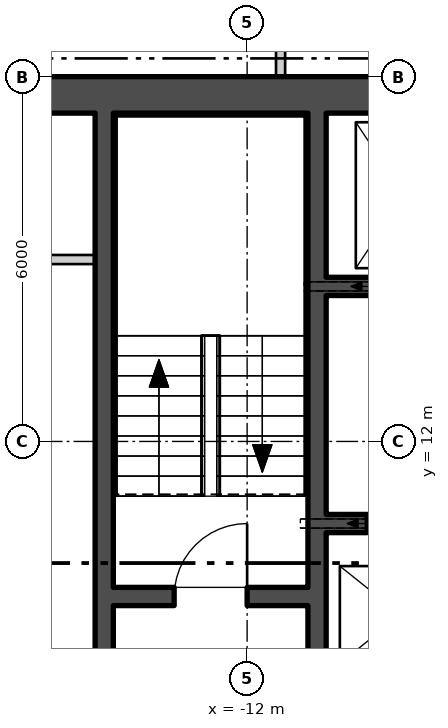
"""IFC4 building model, lengths in metres.
Left out: names, types, materials, properties, quantities, classifications, styles, units other than length and angle.
Written with IfcOpenShell. Run it as: python <this file> out.ifc"""

import sys

from ifc_helpers import new_model, si_unit, direction, frame, frame_2d, origin, place, context, subcontext, project, spatial, rectangle, extrude, element, fill, save


model = new_model("IFC4")
c1 = context("Model", 3, precision=1e-05, world=origin(), true_north=direction((0.0, 1.0)))
c2 = subcontext(c1, "Body", "Model", "MODEL_VIEW")
j1 = project(units=[si_unit("LENGTHUNIT", "METRE"), si_unit("PLANEANGLEUNIT", "RADIAN")], contexts=[c1])
p1 = place(None, origin())
s1 = spatial("IfcSite", under=j1, at=p1, CompositionType="ELEMENT")
p2 = place(p1, origin())
s2 = spatial("IfcBuilding", under=s1, at=p2, CompositionType="ELEMENT")
p3 = place(p2, frame((0.0, 0.0, 8.4)))
s3 = spatial("IfcBuildingStorey", under=s2, at=p3, CompositionType="ELEMENT", Elevation=8.4)
p4 = place(p3, frame((-17.5, 17.7, 0.0), z_axis=(0.0, 0.0, 1.0), x_axis=(1.0, 0.0, 0.0)))
e1 = element("IfcWall", 1, at=p4, inside=s3, PredefinedType="SHEAR", context=c2, shape_type="SweptSolid", body=[
    extrude(rectangle(XDim=35.0, YDim=0.6, at=frame_2d((17.5, 0.0))), origin(), (0.0, 0.0, 1.0), 4.88),
])
p5 = place(p3, frame((-10.85, 0.6, 0.0), z_axis=(0.0, 0.0, 1.0), x_axis=(0.0, 1.0, 0.0)))
e2 = element("IfcWall", 2, at=p5, inside=s3, PredefinedType="SHEAR", context=c2, shape_type="SweptSolid", body=[
    extrude(rectangle(XDim=16.8, YDim=0.3, at=frame_2d((8.4, 0.0))), origin(), (0.0, 0.0, 1.0), 4.88),
])
p6 = place(p5, frame((5.075, 0.0, 0.0)))
e3 = element("IfcOpeningElement", 3, at=p6, cuts=e2, PredefinedType="OPENING", context=c2, shape_type="SweptSolid", body=[
    extrude(rectangle(XDim=1.25, YDim=2.1, at=frame_2d((0.625, 1.05))), frame((0.0, 0.16, 0.0), z_axis=(0.0, -1.0, 0.0), x_axis=(1.0, 0.0, 0.0)), (0.0, 0.0, 1.0), 0.32),
])
p7 = place(p5, frame((1.525, 0.0, 0.0)))
e4 = element("IfcOpeningElement", 4, at=p7, cuts=e2, PredefinedType="OPENING", context=c2, shape_type="SweptSolid", body=[
    extrude(rectangle(XDim=1.0, YDim=2.1, at=frame_2d((0.5, 1.05))), frame((0.0, 0.16, 0.0), z_axis=(0.0, -1.0, 0.0), x_axis=(1.0, 0.0, 0.0)), (0.0, 0.0, 1.0), 0.32),
])
p8 = place(p3, frame((-14.35, 0.6, 0.0), z_axis=(0.0, 0.0, 1.0), x_axis=(0.0, 1.0, 0.0)))
e5 = element("IfcWall", 5, at=p8, inside=s3, PredefinedType="SHEAR", context=c2, shape_type="SweptSolid", body=[
    extrude(rectangle(XDim=16.8, YDim=0.3, at=frame_2d((8.4, 0.0))), origin(), (0.0, 0.0, 1.0), 4.88),
])
p9 = place(p8, frame((5.7, 0.0, 0.0)))
e6 = element("IfcOpeningElement", 6, at=p9, cuts=e5, PredefinedType="OPENING", context=c2, shape_type="SweptSolid", body=[
    extrude(rectangle(XDim=1.5, YDim=2.1, at=frame_2d((0.75, 1.05))), frame((0.0, 0.16, 0.0), z_axis=(0.0, -1.0, 0.0), x_axis=(1.0, 0.0, 0.0)), (0.0, 0.0, 1.0), 0.32),
])
p10 = place(p3, frame((-14.2, 9.45, 0.0), z_axis=(0.0, 0.0, 1.0), x_axis=(1.0, 0.0, 0.0)))
e7 = element("IfcWall", 7, at=p10, inside=s3, PredefinedType="SHEAR", context=c2, shape_type="SweptSolid", body=[
    extrude(rectangle(XDim=3.2, YDim=0.3, at=frame_2d((1.6, 0.0))), origin(), (0.0, 0.0, 1.0), 4.88),
])
p11 = place(p10, frame((1.0, 0.0, 0.0)))
e8 = element("IfcOpeningElement", 8, at=p11, cuts=e7, PredefinedType="OPENING", context=c2, shape_type="SweptSolid", body=[
    extrude(rectangle(XDim=1.2, YDim=2.1, at=frame_2d((0.6, 1.05))), frame((0.0, 0.16, 0.0), z_axis=(0.0, -1.0, 0.0), x_axis=(1.0, 0.0, 0.0)), (0.0, 0.0, 1.0), 0.32),
])
p12 = place(p3, frame((-10.7, 14.55, 0.0), z_axis=(0.0, 0.0, 1.0), x_axis=(1.0, 0.0, 0.0)))
e9 = element("IfcWall", 9, at=p12, inside=s3, PredefinedType="SHEAR", context=c2, shape_type="SweptSolid", body=[
    extrude(rectangle(XDim=21.4, YDim=0.3, at=frame_2d((10.7, 0.0))), origin(), (0.0, 0.0, 1.0), 4.88),
])
p13 = place(p12, frame((0.738, 0.0, 0.0)))
e10 = element("IfcOpeningElement", 10, at=p13, cuts=e9, PredefinedType="OPENING", context=c2, shape_type="SweptSolid", body=[
    extrude(rectangle(XDim=1.1, YDim=2.1, at=frame_2d((0.55, 1.05))), frame((0.0, 0.16, 0.0), z_axis=(0.0, -1.0, 0.0), x_axis=(1.0, 0.0, 0.0)), (0.0, 0.0, 1.0), 0.32),
])
p14 = place(p12, frame((3.462, 0.0, 0.0)))
e11 = element("IfcOpeningElement", 11, at=p14, cuts=e9, PredefinedType="OPENING", context=c2, shape_type="SweptSolid", body=[
    extrude(rectangle(XDim=1.1, YDim=2.1, at=frame_2d((0.55, 1.05))), frame((0.0, 0.16, 0.0), z_axis=(0.0, -1.0, 0.0), x_axis=(1.0, 0.0, 0.0)), (0.0, 0.0, 1.0), 0.32),
])
p15 = place(p12, frame((6.138, 0.0, 0.0)))
e12 = element("IfcOpeningElement", 12, at=p15, cuts=e9, PredefinedType="OPENING", context=c2, shape_type="SweptSolid", body=[
    extrude(rectangle(XDim=1.1, YDim=2.1, at=frame_2d((0.55, 1.05))), frame((0.0, 0.16, 0.0), z_axis=(0.0, -1.0, 0.0), x_axis=(1.0, 0.0, 0.0)), (0.0, 0.0, 1.0), 0.32),
])
p16 = place(p12, frame((8.812, 0.0, 0.0)))
e13 = element("IfcOpeningElement", 13, at=p16, cuts=e9, PredefinedType="OPENING", context=c2, shape_type="SweptSolid", body=[
    extrude(rectangle(XDim=1.1, YDim=2.1, at=frame_2d((0.55, 1.05))), frame((0.0, 0.16, 0.0), z_axis=(0.0, -1.0, 0.0), x_axis=(1.0, 0.0, 0.0)), (0.0, 0.0, 1.0), 0.32),
])
p17 = place(p12, frame((14.162, 0.0, 0.0)))
e14 = element("IfcOpeningElement", 14, at=p17, cuts=e9, PredefinedType="OPENING", context=c2, shape_type="SweptSolid", body=[
    extrude(rectangle(XDim=1.1, YDim=2.1, at=frame_2d((0.55, 1.05))), frame((0.0, 0.16, 0.0), z_axis=(0.0, -1.0, 0.0), x_axis=(1.0, 0.0, 0.0)), (0.0, 0.0, 1.0), 0.32),
])
p18 = place(p12, frame((16.837, 0.0, 0.0)))
e15 = element("IfcOpeningElement", 15, at=p18, cuts=e9, PredefinedType="OPENING", context=c2, shape_type="SweptSolid", body=[
    extrude(rectangle(XDim=1.1, YDim=2.1, at=frame_2d((0.55, 1.05))), frame((0.0, 0.16, 0.0), z_axis=(0.0, -1.0, 0.0), x_axis=(1.0, 0.0, 0.0)), (0.0, 0.0, 1.0), 0.32),
])
p19 = place(p12, frame((19.562, 0.0, 0.0)))
e16 = element("IfcOpeningElement", 16, at=p19, cuts=e9, PredefinedType="OPENING", context=c2, shape_type="SweptSolid", body=[
    extrude(rectangle(XDim=1.1, YDim=2.1, at=frame_2d((0.55, 1.05))), frame((0.0, 0.16, 0.0), z_axis=(0.0, -1.0, 0.0), x_axis=(1.0, 0.0, 0.0)), (0.0, 0.0, 1.0), 0.32),
])
p20 = place(p3, frame((-10.7, 10.65, 0.0), z_axis=(0.0, 0.0, 1.0), x_axis=(1.0, 0.0, 0.0)))
e17 = element("IfcWall", 17, at=p20, inside=s3, PredefinedType="SHEAR", context=c2, shape_type="SweptSolid", body=[
    extrude(rectangle(XDim=10.3, YDim=0.3, at=frame_2d((5.15, 0.0))), origin(), (0.0, 0.0, 1.0), 4.88),
])
p21 = place(p20, frame((0.675, 0.0, 0.0)))
e18 = element("IfcOpeningElement", 18, at=p21, cuts=e17, PredefinedType="OPENING", context=c2, shape_type="SweptSolid", body=[
    extrude(rectangle(XDim=1.1, YDim=2.1, at=frame_2d((0.55, 1.05))), frame((0.0, 0.16, 0.0), z_axis=(0.0, -1.0, 0.0), x_axis=(1.0, 0.0, 0.0)), (0.0, 0.0, 1.0), 0.32),
])
p22 = place(p20, frame((3.275, 0.0, 0.0)))
e19 = element("IfcOpeningElement", 19, at=p22, cuts=e17, PredefinedType="OPENING", context=c2, shape_type="SweptSolid", body=[
    extrude(rectangle(XDim=1.1, YDim=2.1, at=frame_2d((0.55, 1.05))), frame((0.0, 0.16, 0.0), z_axis=(0.0, -1.0, 0.0), x_axis=(1.0, 0.0, 0.0)), (0.0, 0.0, 1.0), 0.32),
])
p23 = place(p20, frame((5.825, 0.0, 0.0)))
e20 = element("IfcOpeningElement", 20, at=p23, cuts=e17, PredefinedType="OPENING", context=c2, shape_type="SweptSolid", body=[
    extrude(rectangle(XDim=1.1, YDim=2.1, at=frame_2d((0.55, 1.05))), frame((0.0, 0.16, 0.0), z_axis=(0.0, -1.0, 0.0), x_axis=(1.0, 0.0, 0.0)), (0.0, 0.0, 1.0), 0.32),
])
p24 = place(p20, frame((8.375, 0.0, 0.0)))
e21 = element("IfcOpeningElement", 21, at=p24, cuts=e17, PredefinedType="OPENING", context=c2, shape_type="SweptSolid", body=[
    extrude(rectangle(XDim=1.1, YDim=2.1, at=frame_2d((0.55, 1.05))), frame((0.0, 0.16, 0.0), z_axis=(0.0, -1.0, 0.0), x_axis=(1.0, 0.0, 0.0)), (0.0, 0.0, 1.0), 0.32),
])
p25 = place(p3, frame((-16.9, 14.992, 0.0), z_axis=(0.0, 0.0, 1.0), x_axis=(1.0, 0.0, 0.0)))
e22 = element("IfcWall", 22, at=p25, inside=s3, PredefinedType="PARTITIONING", context=c2, shape_type="SweptSolid", body=[
    extrude(rectangle(XDim=2.4, YDim=0.15, at=frame_2d((1.2, 0.0))), origin(), (0.0, 0.0, 1.0), 4.88),
])
p26 = place(p3, frame((-11.45, 18.0, 0.0), z_axis=(0.0, 0.0, 1.0), x_axis=(0.0, 1.0, 0.0)))
e23 = element("IfcWall", 23, at=p26, inside=s3, PredefinedType="PARTITIONING", context=c2, shape_type="SweptSolid", body=[
    extrude(rectangle(XDim=1.75, YDim=0.15, at=frame_2d((0.875, 0.0))), origin(), (0.0, 0.0, 1.0), 4.88),
])
p27 = place(p21, origin())
e24 = element("IfcDoor", 24, at=p27, inside=s3, OperationType="SLIDING_TO_LEFT", PredefinedType="DOOR", context=c2, shape_type="SweptSolid", body=[
    extrude(rectangle(XDim=1.1, YDim=2.1, at=frame_2d((0.55, 1.05))), frame((0.0, 0.025, 0.0), z_axis=(0.0, -1.0, 0.0), x_axis=(1.0, 0.0, 0.0)), (0.0, 0.0, 1.0), 0.05),
])
fill(e18, e24)
p28 = place(p11, origin())
e25 = element("IfcDoor", 25, at=p28, inside=s3, OperationType="SINGLE_SWING_LEFT", PredefinedType="DOOR", context=c2, shape_type="SweptSolid", body=[
    extrude(rectangle(XDim=1.2, YDim=2.1, at=frame_2d((0.6, 1.05))), frame((0.0, 0.025, 0.0), z_axis=(0.0, -1.0, 0.0), x_axis=(1.0, 0.0, 0.0)), (0.0, 0.0, 1.0), 0.05),
])
fill(e8, e25)
save(model, sys.argv[1])
